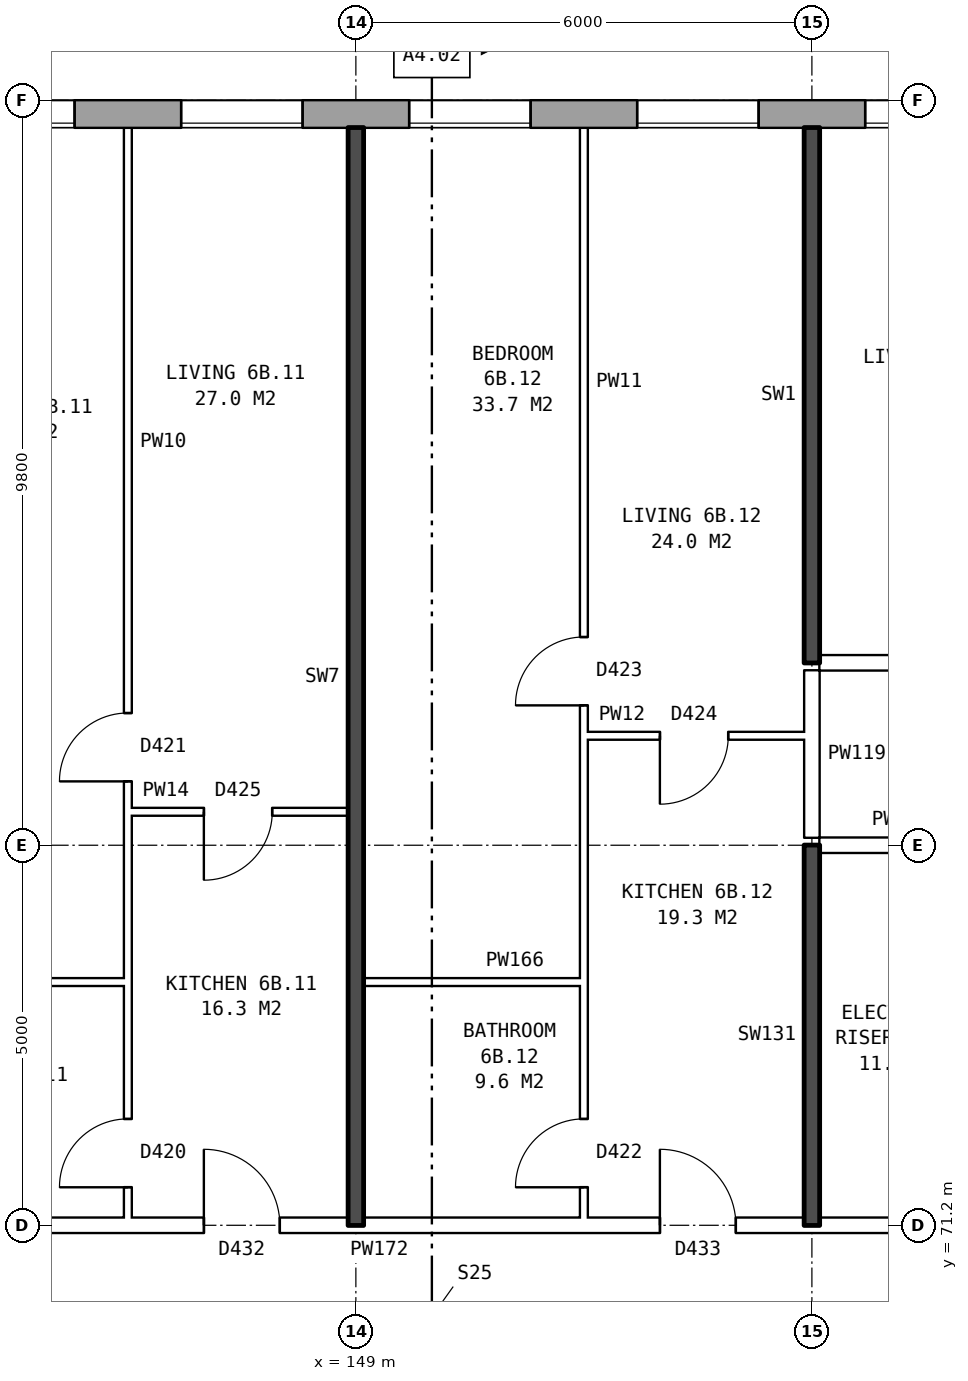
"""IFC4 building model, lengths in metres.
Left out: names, types, materials, properties, quantities, classifications, styles, units other than length and angle.
Written with IfcOpenShell. Run it as: python <this file> out.ifc"""

import sys

from ifc_helpers import new_model, si_unit, direction, frame, frame_2d, origin, place, context, subcontext, project, spatial, rectangle, extrude, element, fill, save


model = new_model("IFC4")
c1 = context("Model", 3, precision=1e-05, world=origin(), true_north=direction((0.0, 1.0)))
c2 = subcontext(c1, "Body", "Model", "MODEL_VIEW")
j1 = project(units=[si_unit("LENGTHUNIT", "METRE"), si_unit("PLANEANGLEUNIT", "RADIAN")], contexts=[c1])
p1 = place(None, origin())
s1 = spatial("IfcSite", under=j1, at=p1, CompositionType="ELEMENT")
p2 = place(p1, origin())
s2 = spatial("IfcBuilding", under=s1, at=p2, CompositionType="ELEMENT")
p3 = place(p2, frame((0.0, 0.0, 25.7)))
s3 = spatial("IfcBuildingStorey", under=s2, at=p3, CompositionType="ELEMENT", Elevation=25.7)
p4 = place(p3, frame((174.675, 85.82, 0.0), z_axis=(0.0, 0.0, 1.0), x_axis=(-1.0, 0.0, 0.0)))
e1 = element("IfcWall", 1, at=p4, inside=s3, PredefinedType="STANDARD", context=c2, shape_type="SweptSolid", body=[
    extrude(rectangle(XDim=40.601, YDim=0.36, at=frame_2d((20.3, 0.0))), origin(), (0.0, 0.0, 1.0), 2.85),
])
p5 = place(p4, frame((2.375, 0.0, 0.8)))
e2 = element("IfcOpeningElement", 2, at=p5, cuts=e1, PredefinedType="OPENING", context=c2, shape_type="SweptSolid", body=[
    extrude(rectangle(XDim=1.6, YDim=1.8, at=frame_2d((0.8, 0.9))), frame((0.0, 0.19, 0.0), z_axis=(0.0, -1.0, 0.0), x_axis=(1.0, 0.0, 0.0)), (0.0, 0.0, 1.0), 0.38),
])
p6 = place(p4, frame((4.275, 0.0, 0.8)))
e3 = element("IfcOpeningElement", 3, at=p6, cuts=e1, PredefinedType="OPENING", context=c2, shape_type="SweptSolid", body=[
    extrude(rectangle(XDim=1.2, YDim=1.8, at=frame_2d((0.6, 0.9))), frame((0.0, 0.19, 0.0), z_axis=(0.0, -1.0, 0.0), x_axis=(1.0, 0.0, 0.0)), (0.0, 0.0, 1.0), 0.38),
])
p7 = place(p4, frame((8.025, 0.0, 0.8)))
e4 = element("IfcOpeningElement", 4, at=p7, cuts=e1, PredefinedType="OPENING", context=c2, shape_type="SweptSolid", body=[
    extrude(rectangle(XDim=0.8, YDim=0.9, at=frame_2d((0.4, 0.45))), frame((0.0, 0.19, 0.0), z_axis=(0.0, -1.0, 0.0), x_axis=(1.0, 0.0, 0.0)), (0.0, 0.0, 1.0), 0.38),
])
p8 = place(p4, frame((11.375, 0.0, 0.8)))
e5 = element("IfcOpeningElement", 5, at=p8, cuts=e1, PredefinedType="OPENING", context=c2, shape_type="SweptSolid", body=[
    extrude(rectangle(XDim=1.6, YDim=1.8, at=frame_2d((0.8, 0.9))), frame((0.0, 0.19, 0.0), z_axis=(0.0, -1.0, 0.0), x_axis=(1.0, 0.0, 0.0)), (0.0, 0.0, 1.0), 0.38),
])
p9 = place(p4, frame((14.375, 0.0, 0.8)))
e6 = element("IfcOpeningElement", 6, at=p9, cuts=e1, PredefinedType="OPENING", context=c2, shape_type="SweptSolid", body=[
    extrude(rectangle(XDim=1.6, YDim=1.8, at=frame_2d((0.8, 0.9))), frame((0.0, 0.19, 0.0), z_axis=(0.0, -1.0, 0.0), x_axis=(1.0, 0.0, 0.0)), (0.0, 0.0, 1.0), 0.38),
])
p10 = place(p4, frame((17.375, 0.0, 0.8)))
e7 = element("IfcOpeningElement", 7, at=p10, cuts=e1, PredefinedType="OPENING", context=c2, shape_type="SweptSolid", body=[
    extrude(rectangle(XDim=1.6, YDim=1.8, at=frame_2d((0.8, 0.9))), frame((0.0, 0.19, 0.0), z_axis=(0.0, -1.0, 0.0), x_axis=(1.0, 0.0, 0.0)), (0.0, 0.0, 1.0), 0.38),
])
p11 = place(p4, frame((20.375, 0.0, 0.8)))
e8 = element("IfcOpeningElement", 8, at=p11, cuts=e1, PredefinedType="OPENING", context=c2, shape_type="SweptSolid", body=[
    extrude(rectangle(XDim=1.6, YDim=1.8, at=frame_2d((0.8, 0.9))), frame((0.0, 0.19, 0.0), z_axis=(0.0, -1.0, 0.0), x_axis=(1.0, 0.0, 0.0)), (0.0, 0.0, 1.0), 0.38),
])
p12 = place(p4, frame((23.375, 0.0, 0.8)))
e9 = element("IfcOpeningElement", 9, at=p12, cuts=e1, PredefinedType="OPENING", context=c2, shape_type="SweptSolid", body=[
    extrude(rectangle(XDim=1.6, YDim=1.8, at=frame_2d((0.8, 0.9))), frame((0.0, 0.19, 0.0), z_axis=(0.0, -1.0, 0.0), x_axis=(1.0, 0.0, 0.0)), (0.0, 0.0, 1.0), 0.38),
])
p13 = place(p4, frame((26.375, 0.0, 0.8)))
e10 = element("IfcOpeningElement", 10, at=p13, cuts=e1, PredefinedType="OPENING", context=c2, shape_type="SweptSolid", body=[
    extrude(rectangle(XDim=1.6, YDim=1.8, at=frame_2d((0.8, 0.9))), frame((0.0, 0.19, 0.0), z_axis=(0.0, -1.0, 0.0), x_axis=(1.0, 0.0, 0.0)), (0.0, 0.0, 1.0), 0.38),
])
p14 = place(p4, frame((29.375, 0.0, 0.8)))
e11 = element("IfcOpeningElement", 11, at=p14, cuts=e1, PredefinedType="OPENING", context=c2, shape_type="SweptSolid", body=[
    extrude(rectangle(XDim=1.6, YDim=1.8, at=frame_2d((0.8, 0.9))), frame((0.0, 0.19, 0.0), z_axis=(0.0, -1.0, 0.0), x_axis=(1.0, 0.0, 0.0)), (0.0, 0.0, 1.0), 0.38),
])
p15 = place(p4, frame((31.875, 0.0, 0.8)))
e12 = element("IfcOpeningElement", 12, at=p15, cuts=e1, PredefinedType="OPENING", context=c2, shape_type="SweptSolid", body=[
    extrude(rectangle(XDim=0.6, YDim=0.9, at=frame_2d((0.3, 0.45))), frame((0.0, 0.19, 0.0), z_axis=(0.0, -1.0, 0.0), x_axis=(1.0, 0.0, 0.0)), (0.0, 0.0, 1.0), 0.38),
])
p16 = place(p4, frame((35.375, 0.0, 0.8)))
e13 = element("IfcOpeningElement", 13, at=p16, cuts=e1, PredefinedType="OPENING", context=c2, shape_type="SweptSolid", body=[
    extrude(rectangle(XDim=1.6, YDim=1.8, at=frame_2d((0.8, 0.9))), frame((0.0, 0.19, 0.0), z_axis=(0.0, -1.0, 0.0), x_axis=(1.0, 0.0, 0.0)), (0.0, 0.0, 1.0), 0.38),
])
p17 = place(p4, frame((38.375, 0.0, 0.8)))
e14 = element("IfcOpeningElement", 14, at=p17, cuts=e1, PredefinedType="OPENING", context=c2, shape_type="SweptSolid", body=[
    extrude(rectangle(XDim=1.6, YDim=1.8, at=frame_2d((0.8, 0.9))), frame((0.0, 0.19, 0.0), z_axis=(0.0, -1.0, 0.0), x_axis=(1.0, 0.0, 0.0)), (0.0, 0.0, 1.0), 0.38),
])
p18 = place(p4, frame((5.775, 0.0, 1.7)))
e15 = element("IfcOpeningElement", 15, at=p18, cuts=e1, PredefinedType="OPENING", context=c2, shape_type="SweptSolid", body=[
    extrude(rectangle(XDim=1.0, YDim=0.9, at=frame_2d((0.5, 0.45))), frame((0.0, 0.19, 0.0), z_axis=(0.0, -1.0, 0.0), x_axis=(1.0, 0.0, 0.0)), (0.0, 0.0, 1.0), 0.38),
])
p19 = place(p4, frame((9.125, 0.0, 0.8)))
e16 = element("IfcOpeningElement", 16, at=p19, cuts=e1, PredefinedType="OPENING", context=c2, shape_type="SweptSolid", body=[
    extrude(rectangle(XDim=1.2, YDim=1.8, at=frame_2d((0.6, 0.9))), frame((0.0, 0.19, 0.0), z_axis=(0.0, -1.0, 0.0), x_axis=(1.0, 0.0, 0.0)), (0.0, 0.0, 1.0), 0.38),
])
p20 = place(p4, frame((33.825, 0.0, 1.7)))
e17 = element("IfcOpeningElement", 17, at=p20, cuts=e1, PredefinedType="OPENING", context=c2, shape_type="SweptSolid", body=[
    extrude(rectangle(XDim=1.2, YDim=0.9, at=frame_2d((0.6, 0.45))), frame((0.0, 0.19, 0.0), z_axis=(0.0, -1.0, 0.0), x_axis=(1.0, 0.0, 0.0)), (0.0, 0.0, 1.0), 0.38),
])
p21 = place(p3, frame((142.76, 71.2, 0.0), z_axis=(0.0, 0.0, 1.0), x_axis=(1.0, 0.0, 0.0)))
e18 = element("IfcWall", 18, at=p21, inside=s3, PredefinedType="PARTITIONING", context=c2, shape_type="SweptSolid", body=[
    extrude(rectangle(XDim=14.48, YDim=0.2, at=frame_2d((7.24, 0.0))), origin(), (0.0, 0.0, 1.0), 2.85),
])
p22 = place(p21, frame((4.24, 0.0, 0.0)))
e19 = element("IfcOpeningElement", 19, at=p22, cuts=e18, PredefinedType="OPENING", context=c2, shape_type="SweptSolid", body=[
    extrude(rectangle(XDim=1.0, YDim=2.1, at=frame_2d((0.5, 1.05))), frame((0.0, 0.11, 0.0), z_axis=(0.0, -1.0, 0.0), x_axis=(1.0, 0.0, 0.0)), (0.0, 0.0, 1.0), 0.22),
])
p23 = place(p21, frame((10.24, 0.0, 0.0)))
e20 = element("IfcOpeningElement", 20, at=p23, cuts=e18, PredefinedType="OPENING", context=c2, shape_type="SweptSolid", body=[
    extrude(rectangle(XDim=1.0, YDim=2.1, at=frame_2d((0.5, 1.05))), frame((0.0, 0.11, 0.0), z_axis=(0.0, -1.0, 0.0), x_axis=(1.0, 0.0, 0.0)), (0.0, 0.0, 1.0), 0.22),
])
p24 = place(p3, frame((142.76, 74.4, 0.0), z_axis=(0.0, 0.0, 1.0), x_axis=(1.0, 0.0, 0.0)))
e21 = element("IfcWall", 21, at=p24, inside=s3, PredefinedType="PARTITIONING", context=c2, shape_type="SweptSolid", body=[
    extrude(rectangle(XDim=3.24, YDim=0.1, at=frame_2d((1.62, 0.0))), origin(), (0.0, 0.0, 1.0), 2.85),
])
p25 = place(p3, frame((149.1, 74.4, 0.0), z_axis=(0.0, 0.0, 1.0), x_axis=(1.0, 0.0, 0.0)))
e22 = element("IfcWall", 22, at=p25, inside=s3, PredefinedType="PARTITIONING", context=c2, shape_type="SweptSolid", body=[
    extrude(rectangle(XDim=2.9, YDim=0.1, at=frame_2d((1.45, 0.0))), origin(), (0.0, 0.0, 1.0), 2.85),
])
p26 = place(p3, frame((155.1, 76.2, 0.0), z_axis=(0.0, 0.0, 1.0), x_axis=(1.0, 0.0, 0.0)))
e23 = element("IfcWall", 23, at=p26, inside=s3, PredefinedType="PARTITIONING", context=c2, shape_type="SweptSolid", body=[
    extrude(rectangle(XDim=2.14, YDim=0.2, at=frame_2d((1.07, 0.0))), origin(), (0.0, 0.0, 1.0), 2.85),
])
p27 = place(p3, frame((146.0, 76.64, 0.0), z_axis=(0.0, 0.0, 1.0), x_axis=(1.0, 0.0, 0.0)))
e24 = element("IfcWall", 24, at=p27, inside=s3, PredefinedType="PARTITIONING", context=c2, shape_type="SweptSolid", body=[
    extrude(rectangle(XDim=2.9, YDim=0.1, at=frame_2d((1.45, 0.0))), origin(), (0.0, 0.0, 1.0), 2.85),
])
p28 = place(p27, frame((1.0, 0.0, 0.0)))
e25 = element("IfcOpeningElement", 25, at=p28, cuts=e24, PredefinedType="OPENING", context=c2, shape_type="SweptSolid", body=[
    extrude(rectangle(XDim=0.9, YDim=2.1, at=frame_2d((0.45, 1.05))), frame((0.0, 0.06, 0.0), z_axis=(0.0, -1.0, 0.0), x_axis=(1.0, 0.0, 0.0)), (0.0, 0.0, 1.0), 0.12),
])
p29 = place(p3, frame((152.0, 77.64, 0.0), z_axis=(0.0, 0.0, 1.0), x_axis=(1.0, 0.0, 0.0)))
e26 = element("IfcWall", 26, at=p29, inside=s3, PredefinedType="PARTITIONING", context=c2, shape_type="SweptSolid", body=[
    extrude(rectangle(XDim=2.9, YDim=0.1, at=frame_2d((1.45, 0.0))), origin(), (0.0, 0.0, 1.0), 2.85),
])
p30 = place(p29, frame((1.0, 0.0, 0.0)))
e27 = element("IfcOpeningElement", 27, at=p30, cuts=e26, PredefinedType="OPENING", context=c2, shape_type="SweptSolid", body=[
    extrude(rectangle(XDim=0.9, YDim=2.1, at=frame_2d((0.45, 1.05))), frame((0.0, 0.06, 0.0), z_axis=(0.0, -1.0, 0.0), x_axis=(1.0, 0.0, 0.0)), (0.0, 0.0, 1.0), 0.12),
])
p31 = place(p3, frame((155.1, 78.6, 0.0), z_axis=(0.0, 0.0, 1.0), x_axis=(1.0, 0.0, 0.0)))
e28 = element("IfcWall", 28, at=p31, inside=s3, PredefinedType="PARTITIONING", context=c2, shape_type="SweptSolid", body=[
    extrude(rectangle(XDim=22.29, YDim=0.2, at=frame_2d((11.145, 0.0))), origin(), (0.0, 0.0, 1.0), 2.85),
])
p32 = place(p31, frame((2.45, 0.0, 0.0)))
e29 = element("IfcOpeningElement", 29, at=p32, cuts=e28, PredefinedType="OPENING", context=c2, shape_type="SweptSolid", body=[
    extrude(rectangle(XDim=1.0, YDim=2.1, at=frame_2d((0.5, 1.05))), frame((0.0, 0.11, 0.0), z_axis=(0.0, -1.0, 0.0), x_axis=(1.0, 0.0, 0.0)), (0.0, 0.0, 1.0), 0.22),
])
p33 = place(p31, frame((14.4, 0.0, 0.0)))
e30 = element("IfcOpeningElement", 30, at=p33, cuts=e28, PredefinedType="OPENING", context=c2, shape_type="SweptSolid", body=[
    extrude(rectangle(XDim=1.0, YDim=2.1, at=frame_2d((0.5, 1.05))), frame((0.0, 0.11, 0.0), z_axis=(0.0, -1.0, 0.0), x_axis=(1.0, 0.0, 0.0)), (0.0, 0.0, 1.0), 0.22),
])
p34 = place(p3, frame((146.0, 71.3, 0.0), z_axis=(0.0, 0.0, 1.0), x_axis=(0.0, 1.0, 0.0)))
e31 = element("IfcWall", 31, at=p34, inside=s3, PredefinedType="PARTITIONING", context=c2, shape_type="SweptSolid", body=[
    extrude(rectangle(XDim=14.34, YDim=0.1, at=frame_2d((7.17, 0.0))), origin(), (0.0, 0.0, 1.0), 2.85),
])
p35 = place(p34, frame((5.74, 0.0, 0.0)))
e32 = element("IfcOpeningElement", 32, at=p35, cuts=e31, PredefinedType="OPENING", context=c2, shape_type="SweptSolid", body=[
    extrude(rectangle(XDim=0.9, YDim=2.1, at=frame_2d((0.45, 1.05))), frame((0.0, 0.06, 0.0), z_axis=(0.0, -1.0, 0.0), x_axis=(1.0, 0.0, 0.0)), (0.0, 0.0, 1.0), 0.12),
])
p36 = place(p34, frame((0.4, 0.0, 0.0)))
e33 = element("IfcOpeningElement", 33, at=p36, cuts=e31, PredefinedType="OPENING", context=c2, shape_type="SweptSolid", body=[
    extrude(rectangle(XDim=0.9, YDim=2.1, at=frame_2d((0.45, 1.05))), frame((0.0, 0.06, 0.0), z_axis=(0.0, -1.0, 0.0), x_axis=(1.0, 0.0, 0.0)), (0.0, 0.0, 1.0), 0.12),
])
p37 = place(p3, frame((149.0, 71.2, 0.0), z_axis=(0.0, 0.0, 1.0), x_axis=(0.0, 1.0, 0.0)))
e34 = element("IfcWall", 34, at=p37, inside=s3, PredefinedType="SOLIDWALL", context=c2, shape_type="SweptSolid", body=[
    extrude(rectangle(XDim=14.44, YDim=0.2, at=frame_2d((7.22, 0.0))), origin(), (0.0, 0.0, 1.0), 2.85),
])
p38 = place(p3, frame((152.0, 71.3, 0.0), z_axis=(0.0, 0.0, 1.0), x_axis=(0.0, 1.0, 0.0)))
e35 = element("IfcWall", 35, at=p38, inside=s3, PredefinedType="PARTITIONING", context=c2, shape_type="SweptSolid", body=[
    extrude(rectangle(XDim=14.34, YDim=0.1, at=frame_2d((7.17, 0.0))), origin(), (0.0, 0.0, 1.0), 2.85),
])
p39 = place(p38, frame((6.74, 0.0, 0.0)))
e36 = element("IfcOpeningElement", 36, at=p39, cuts=e35, PredefinedType="OPENING", context=c2, shape_type="SweptSolid", body=[
    extrude(rectangle(XDim=0.9, YDim=2.1, at=frame_2d((0.45, 1.05))), frame((0.0, 0.06, 0.0), z_axis=(0.0, -1.0, 0.0), x_axis=(1.0, 0.0, 0.0)), (0.0, 0.0, 1.0), 0.12),
])
p40 = place(p38, frame((0.4, 0.0, 0.0)))
e37 = element("IfcOpeningElement", 37, at=p40, cuts=e35, PredefinedType="OPENING", context=c2, shape_type="SweptSolid", body=[
    extrude(rectangle(XDim=0.9, YDim=2.1, at=frame_2d((0.45, 1.05))), frame((0.0, 0.06, 0.0), z_axis=(0.0, -1.0, 0.0), x_axis=(1.0, 0.0, 0.0)), (0.0, 0.0, 1.0), 0.12),
])
p41 = place(p3, frame((155.0, 71.2, 0.0), z_axis=(0.0, 0.0, 1.0), x_axis=(0.0, 1.0, 0.0)))
e38 = element("IfcWall", 38, at=p41, inside=s3, PredefinedType="SOLIDWALL", context=c2, shape_type="SweptSolid", body=[
    extrude(rectangle(XDim=5.0, YDim=0.2, at=frame_2d((2.5, 0.0))), origin(), (0.0, 0.0, 1.0), 2.85),
])
p42 = place(p3, frame((155.0, 76.3, 0.0), z_axis=(0.0, 0.0, 1.0), x_axis=(0.0, 1.0, 0.0)))
e39 = element("IfcWall", 39, at=p42, inside=s3, PredefinedType="PARTITIONING", context=c2, shape_type="SweptSolid", body=[
    extrude(rectangle(XDim=2.2, YDim=0.2, at=frame_2d((1.1, 0.0))), origin(), (0.0, 0.0, 1.0), 2.85),
])
p43 = place(p3, frame((155.0, 78.6, 0.0), z_axis=(0.0, 0.0, 1.0), x_axis=(0.0, 1.0, 0.0)))
e40 = element("IfcWall", 40, at=p43, inside=s3, PredefinedType="SOLIDWALL", context=c2, shape_type="SweptSolid", body=[
    extrude(rectangle(XDim=7.04, YDim=0.2, at=frame_2d((3.52, 0.0))), origin(), (0.0, 0.0, 1.0), 2.85),
])
p44 = place(p10, origin())
e41 = element("IfcWindow", 41, at=p44, inside=s3, PartitioningType="SINGLE_PANEL", PredefinedType="WINDOW", context=c2, shape_type="SweptSolid", body=[
    extrude(rectangle(XDim=1.6, YDim=1.8, at=frame_2d((0.8, 0.9))), frame((0.0, 0.15, 0.0), z_axis=(0.0, -1.0, 0.0), x_axis=(1.0, 0.0, 0.0)), (0.0, 0.0, 1.0), 0.06),
])
fill(e7, e41)
p45 = place(p11, origin())
e42 = element("IfcWindow", 42, at=p45, inside=s3, PartitioningType="SINGLE_PANEL", PredefinedType="WINDOW", context=c2, shape_type="SweptSolid", body=[
    extrude(rectangle(XDim=1.6, YDim=1.8, at=frame_2d((0.8, 0.9))), frame((0.0, 0.15, 0.0), z_axis=(0.0, -1.0, 0.0), x_axis=(1.0, 0.0, 0.0)), (0.0, 0.0, 1.0), 0.06),
])
fill(e8, e42)
p46 = place(p12, origin())
e43 = element("IfcWindow", 43, at=p46, inside=s3, PartitioningType="SINGLE_PANEL", PredefinedType="WINDOW", context=c2, shape_type="SweptSolid", body=[
    extrude(rectangle(XDim=1.6, YDim=1.8, at=frame_2d((0.8, 0.9))), frame((0.0, 0.15, 0.0), z_axis=(0.0, -1.0, 0.0), x_axis=(1.0, 0.0, 0.0)), (0.0, 0.0, 1.0), 0.06),
])
fill(e9, e43)
p47 = place(p13, origin())
e44 = element("IfcWindow", 44, at=p47, inside=s3, PartitioningType="SINGLE_PANEL", PredefinedType="WINDOW", context=c2, shape_type="SweptSolid", body=[
    extrude(rectangle(XDim=1.6, YDim=1.8, at=frame_2d((0.8, 0.9))), frame((0.0, 0.15, 0.0), z_axis=(0.0, -1.0, 0.0), x_axis=(1.0, 0.0, 0.0)), (0.0, 0.0, 1.0), 0.06),
])
fill(e10, e44)
p48 = place(p14, origin())
e45 = element("IfcWindow", 45, at=p48, inside=s3, PartitioningType="SINGLE_PANEL", PredefinedType="WINDOW", context=c2, shape_type="SweptSolid", body=[
    extrude(rectangle(XDim=1.6, YDim=1.8, at=frame_2d((0.8, 0.9))), frame((0.0, 0.15, 0.0), z_axis=(0.0, -1.0, 0.0), x_axis=(1.0, 0.0, 0.0)), (0.0, 0.0, 1.0), 0.06),
])
fill(e11, e45)
p49 = place(p35, origin())
e46 = element("IfcDoor", 46, at=p49, inside=s3, OperationType="SINGLE_SWING_LEFT", PredefinedType="DOOR", context=c2, shape_type="SweptSolid", body=[
    extrude(rectangle(XDim=0.9, YDim=2.1, at=frame_2d((0.45, 1.05))), frame((0.0, 0.025, 0.0), z_axis=(0.0, -1.0, 0.0), x_axis=(1.0, 0.0, 0.0)), (0.0, 0.0, 1.0), 0.05),
])
fill(e32, e46)
p50 = place(p22, origin())
e47 = element("IfcDoor", 47, at=p50, inside=s3, OperationType="SINGLE_SWING_LEFT", PredefinedType="DOOR", context=c2, shape_type="SweptSolid", body=[
    extrude(rectangle(XDim=1.0, YDim=2.1, at=frame_2d((0.5, 1.05))), frame((0.0, 0.025, 0.0), z_axis=(0.0, -1.0, 0.0), x_axis=(1.0, 0.0, 0.0)), (0.0, 0.0, 1.0), 0.05),
])
fill(e19, e47)
p51 = place(p28, frame((0.9, 0.0, 0.0), z_axis=(0.0, 0.0, 1.0), x_axis=(-1.0, 0.0, 0.0)))
e48 = element("IfcDoor", 48, at=p51, inside=s3, OperationType="SINGLE_SWING_RIGHT", PredefinedType="DOOR", context=c2, shape_type="SweptSolid", body=[
    extrude(rectangle(XDim=0.9, YDim=2.1, at=frame_2d((0.45, 1.05))), frame((0.0, 0.025, 0.0), z_axis=(0.0, -1.0, 0.0), x_axis=(1.0, 0.0, 0.0)), (0.0, 0.0, 1.0), 0.05),
])
fill(e25, e48)
p52 = place(p36, origin())
e49 = element("IfcDoor", 49, at=p52, inside=s3, OperationType="SINGLE_SWING_LEFT", PredefinedType="DOOR", context=c2, shape_type="SweptSolid", body=[
    extrude(rectangle(XDim=0.9, YDim=2.1, at=frame_2d((0.45, 1.05))), frame((0.0, 0.025, 0.0), z_axis=(0.0, -1.0, 0.0), x_axis=(1.0, 0.0, 0.0)), (0.0, 0.0, 1.0), 0.05),
])
fill(e33, e49)
p53 = place(p39, origin())
e50 = element("IfcDoor", 50, at=p53, inside=s3, OperationType="SINGLE_SWING_LEFT", PredefinedType="DOOR", context=c2, shape_type="SweptSolid", body=[
    extrude(rectangle(XDim=0.9, YDim=2.1, at=frame_2d((0.45, 1.05))), frame((0.0, 0.025, 0.0), z_axis=(0.0, -1.0, 0.0), x_axis=(1.0, 0.0, 0.0)), (0.0, 0.0, 1.0), 0.05),
])
fill(e36, e50)
p54 = place(p23, origin())
e51 = element("IfcDoor", 51, at=p54, inside=s3, OperationType="SINGLE_SWING_LEFT", PredefinedType="DOOR", context=c2, shape_type="SweptSolid", body=[
    extrude(rectangle(XDim=1.0, YDim=2.1, at=frame_2d((0.5, 1.05))), frame((0.0, 0.025, 0.0), z_axis=(0.0, -1.0, 0.0), x_axis=(1.0, 0.0, 0.0)), (0.0, 0.0, 1.0), 0.05),
])
fill(e20, e51)
p55 = place(p30, frame((0.9, 0.0, 0.0), z_axis=(0.0, 0.0, 1.0), x_axis=(-1.0, 0.0, 0.0)))
e52 = element("IfcDoor", 52, at=p55, inside=s3, OperationType="SINGLE_SWING_RIGHT", PredefinedType="DOOR", context=c2, shape_type="SweptSolid", body=[
    extrude(rectangle(XDim=0.9, YDim=2.1, at=frame_2d((0.45, 1.05))), frame((0.0, 0.025, 0.0), z_axis=(0.0, -1.0, 0.0), x_axis=(1.0, 0.0, 0.0)), (0.0, 0.0, 1.0), 0.05),
])
fill(e27, e52)
p56 = place(p40, origin())
e53 = element("IfcDoor", 53, at=p56, inside=s3, OperationType="SINGLE_SWING_LEFT", PredefinedType="DOOR", context=c2, shape_type="SweptSolid", body=[
    extrude(rectangle(XDim=0.9, YDim=2.1, at=frame_2d((0.45, 1.05))), frame((0.0, 0.025, 0.0), z_axis=(0.0, -1.0, 0.0), x_axis=(1.0, 0.0, 0.0)), (0.0, 0.0, 1.0), 0.05),
])
fill(e37, e53)
save(model, sys.argv[1])
